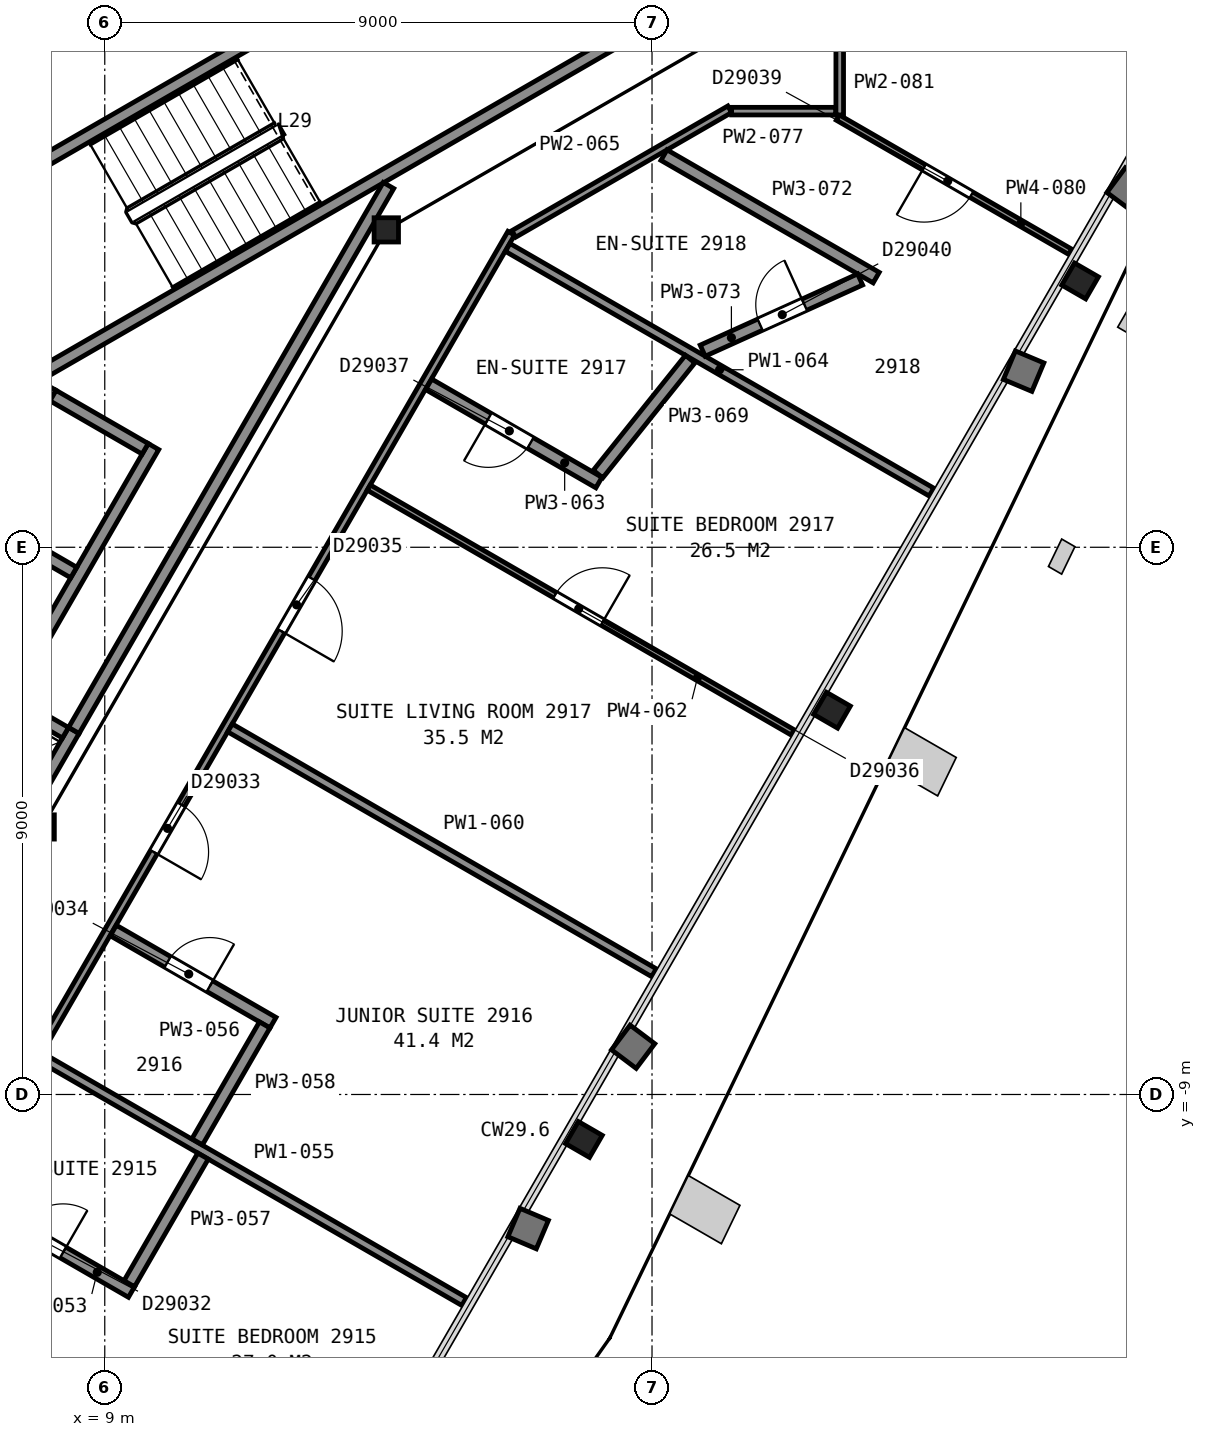
"""IFC4 building model, lengths in metres.
Left out: names, types, materials, properties, quantities, classifications, styles, units other than length and angle.
Written with IfcOpenShell. Run it as: python <this file> out.ifc"""

import sys

from ifc_helpers import new_model, si_unit, direction, frame, frame_2d, origin, origin_2d, place, context, subcontext, project, spatial, rectangle, i_section, extrude, element, fill, save


model = new_model("IFC4")
c1 = context("Model", 3, precision=1e-05, world=origin(), true_north=direction((0.0, 1.0)))
c2 = subcontext(c1, "Body", "Model", "MODEL_VIEW")
j1 = project(units=[si_unit("LENGTHUNIT", "METRE"), si_unit("PLANEANGLEUNIT", "RADIAN")], contexts=[c1])
p1 = place(None, origin())
s1 = spatial("IfcSite", under=j1, at=p1, CompositionType="ELEMENT")
p2 = place(p1, origin())
s2 = spatial("IfcBuilding", under=s1, at=p2, CompositionType="ELEMENT")
p3 = place(p2, frame((0.0, 0.0, 121.6)))
s3 = spatial("IfcBuildingStorey", under=s2, at=p3, CompositionType="ELEMENT", Elevation=121.6)
p4 = place(p3, frame((16.88, -9.74, 0.035), z_axis=(0.0, 0.0, 1.0), x_axis=(-0.5, -0.866025403784, 0.0)))
e1 = element("IfcColumn", 1, at=p4, inside=s3, PredefinedType="COLUMN", context=c2, shape_type="SweptSolid", body=[
    extrude(i_section(OverallWidth=0.419, OverallDepth=0.455, WebThickness=0.042, FlangeThickness=0.068, FilletRadius=0.015, at=origin_2d()), origin(), (0.0, 0.0, 1.0), 3.565),
])
p5 = place(p3, frame((20.96, -2.68, 0.04), z_axis=(0.0, 0.0, 1.0), x_axis=(-0.5, -0.866025403784, 0.0)))
e2 = element("IfcColumn", 2, at=p5, inside=s3, PredefinedType="COLUMN", context=c2, shape_type="SweptSolid", body=[
    extrude(i_section(OverallWidth=0.419, OverallDepth=0.455, WebThickness=0.042, FlangeThickness=0.068, FilletRadius=0.015, at=origin_2d()), origin(), (0.0, 0.0, 1.0), 3.56),
])
p6 = place(p3, frame((25.04, 4.38, 0.045), z_axis=(0.0, 0.0, 1.0), x_axis=(-0.5, -0.866025403784, 0.0)))
e3 = element("IfcColumn", 3, at=p6, inside=s3, PredefinedType="COLUMN", context=c2, shape_type="SweptSolid", body=[
    extrude(i_section(OverallWidth=0.419, OverallDepth=0.455, WebThickness=0.042, FlangeThickness=0.068, FilletRadius=0.015, at=origin_2d()), origin(), (0.0, 0.0, 1.0), 3.555),
])
for number, where, z_axis, x_axis in (
    (4, (13.63, 5.22, 0.0), (0.0, 0.0, 1.0), (1.0, 0.0, 0.0)),
    (5, (7.97, -4.6, 0.0), (0.0, 0.0, 1.0), (1.0, 0.0, 0.0)),
):
    element("IfcColumn", number, at=place(p3, frame(where, z_axis=z_axis, x_axis=x_axis)), inside=s3, PredefinedType="COLUMN", context=c2, shape_type="SweptSolid", body=[
        extrude(i_section(OverallWidth=0.401, OverallDepth=0.399, WebThickness=0.025, FlangeThickness=0.04, FilletRadius=0.015, at=origin_2d()), origin(), (0.0, 0.0, 1.0), 3.6),
    ])
for number, where, z_axis, x_axis in (
    (6, (6.178, 5.299, 0.0), (0.0, 0.0, 1.0), (0.866, 0.5, 0.0)),
    (7, (7.678, 2.701, 0.0), (0.0, 0.0, 1.0), (0.866, 0.5, 0.0)),
):
    element("IfcWall", number, at=place(p3, frame(where, z_axis=z_axis, x_axis=x_axis)), inside=s3, PredefinedType="PARTITIONING", context=c2, shape_type="SweptSolid", body=[
        extrude(rectangle(XDim=12.0, YDim=0.2, at=frame_2d((6.0, 0.0))), origin(), (0.0, 0.0, 1.0), 3.35),
    ])
p7 = place(p3, frame((7.216, -5.222, 0.0), z_axis=(0.0, 0.0, 1.0), x_axis=(0.499990435942, 0.866030925526, 0.0)))
e8 = element("IfcWall", 8, at=p7, inside=s3, PredefinedType="PARTITIONING", context=c2, shape_type="SweptSolid", body=[
    extrude(rectangle(XDim=2.55, YDim=0.2, at=frame_2d((1.275, 0.0))), origin(), (0.0, 0.0, 1.0), 3.6),
])
p8 = place(p3, frame((7.451, -2.414, 0.0), z_axis=(0.0, 0.0, 1.0), x_axis=(0.500016218704, 0.866016039709, 0.0)))
e9 = element("IfcWall", 9, at=p8, inside=s3, PredefinedType="PARTITIONING", context=c2, shape_type="SweptSolid", body=[
    extrude(rectangle(XDim=4.7, YDim=0.2, at=frame_2d((2.35, 0.0))), origin(), (0.0, 0.0, 1.0), 3.6),
])
p9 = place(p3, frame((5.663, -1.612, 0.0), z_axis=(0.0, 0.0, 1.0), x_axis=(0.49998122708, 0.866036242063, 0.0)))
e10 = element("IfcWall", 10, at=p9, inside=s3, PredefinedType="PARTITIONING", context=c2, shape_type="SweptSolid", body=[
    extrude(rectangle(XDim=4.9, YDim=0.2, at=frame_2d((2.45, 0.0))), origin(), (0.0, 0.0, 1.0), 3.6),
])
p10 = place(p3, frame((9.665, 1.62, 0.0), z_axis=(0.0, 0.0, 1.0), x_axis=(-0.866002029911, 0.500040482552, 0.0)))
e11 = element("IfcWall", 11, at=p10, inside=s3, PredefinedType="PARTITIONING", context=c2, shape_type="SweptSolid", body=[
    extrude(rectangle(XDim=1.75, YDim=0.2, at=frame_2d((0.875, 0.0))), origin(), (0.0, 0.0, 1.0), 3.6),
])
p11 = place(p3, frame((8.49, -0.416, 0.0), z_axis=(0.0, 0.0, 1.0), x_axis=(-0.866036909293, 0.499980071345, 0.0)))
e12 = element("IfcWall", 12, at=p11, inside=s3, PredefinedType="PARTITIONING", context=c2, shape_type="SweptSolid", body=[
    extrude(rectangle(XDim=1.75, YDim=0.2, at=frame_2d((0.875, 0.0))), origin(), (0.0, 0.0, 1.0), 3.6),
])
p12 = place(p3, frame((8.354, -3.051, 0.0), z_axis=(0.0, 0.0, 1.0), x_axis=(-0.866060182126, 0.499939757307, 0.0)))
e13 = element("IfcWall", 13, at=p12, inside=s3, PredefinedType="PARTITIONING", context=c2, shape_type="SweptSolid", body=[
    extrude(rectangle(XDim=2.95, YDim=0.2, at=frame_2d((1.475, 0.0))), origin(), (0.0, 0.0, 1.0), 3.6),
])
p13 = place(p3, frame((8.492, -3.012, 0.0), z_axis=(0.0, 0.0, 1.0), x_axis=(0.499972957231, 0.866041016371, 0.0)))
e14 = element("IfcWall", 14, at=p13, inside=s3, PredefinedType="PARTITIONING", context=c2, shape_type="SweptSolid", body=[
    extrude(rectangle(XDim=10.349, YDim=0.2, at=frame_2d((5.174, 0.0))), origin(), (0.0, 0.0, 1.0), 3.35),
])
p14 = place(p3, frame((15.684, 5.165, 0.0), z_axis=(0.0, 0.0, 1.0), x_axis=(-0.500027787016, -0.866009360349, 0.0)))
e15 = element("IfcWall", 15, at=p14, inside=s3, PredefinedType="PARTITIONING", context=c2, shape_type="SweptSolid", body=[
    extrude(rectangle(XDim=23.856, YDim=0.125, at=frame_2d((11.928, 0.0))), origin(), (0.0, 0.0, 1.0), 2.613),
])
p15 = place(p14, frame((21.493, 0.0, 0.0)))
e16 = element("IfcOpeningElement", 16, at=p15, cuts=e15, PredefinedType="OPENING", context=c2, shape_type="SweptSolid", body=[
    extrude(rectangle(XDim=1.0, YDim=2.1, at=frame_2d((0.5, 1.05))), frame((0.0, 0.073, 0.0), z_axis=(0.0, -1.0, 0.0), x_axis=(1.0, 0.0, 0.0)), (0.0, 0.0, 1.0), 0.145),
])
p16 = place(p14, frame((10.853, 0.0, 0.0)))
e17 = element("IfcOpeningElement", 17, at=p16, cuts=e15, PredefinedType="OPENING", context=c2, shape_type="SweptSolid", body=[
    extrude(rectangle(XDim=0.9, YDim=2.1, at=frame_2d((0.45, 1.05))), frame((0.0, 0.073, 0.0), z_axis=(0.0, -1.0, 0.0), x_axis=(1.0, 0.0, 0.0)), (0.0, 0.0, 1.0), 0.145),
])
p17 = place(p14, frame((6.558, 0.0, 0.0)))
e18 = element("IfcOpeningElement", 18, at=p17, cuts=e15, PredefinedType="OPENING", context=c2, shape_type="SweptSolid", body=[
    extrude(rectangle(XDim=1.0, YDim=2.1, at=frame_2d((0.5, 1.05))), frame((0.0, 0.073, 0.0), z_axis=(0.0, -1.0, 0.0), x_axis=(1.0, 0.0, 0.0)), (0.0, 0.0, 1.0), 0.145),
])
p18 = place(p3, frame((5.654, -12.331, 0.0), z_axis=(0.0, 0.0, 1.0), x_axis=(0.866051796338, -0.49995428397, 0.0)))
e19 = element("IfcWall", 19, at=p18, inside=s3, PredefinedType="PARTITIONING", context=c2, shape_type="SweptSolid", body=[
    extrude(rectangle(XDim=8.052, YDim=0.1, at=frame_2d((4.026, 0.0))), origin(), (0.0, 0.0, 1.0), 2.613),
])
p19 = place(p18, frame((3.538, 0.0, 0.0)))
e20 = element("IfcOpeningElement", 20, at=p19, cuts=e19, PredefinedType="OPENING", context=c2, shape_type="SweptSolid", body=[
    extrude(rectangle(XDim=0.9, YDim=2.1, at=frame_2d((0.45, 1.05))), frame((0.0, 0.06, 0.0), z_axis=(0.0, -1.0, 0.0), x_axis=(1.0, 0.0, 0.0)), (0.0, 0.0, 1.0), 0.12),
])
p20 = place(p3, frame((6.64, -10.633, 0.0), z_axis=(0.0, 0.0, 1.0), x_axis=(0.866022073929, -0.500005767435, 0.0)))
e21 = element("IfcWall", 21, at=p20, inside=s3, PredefinedType="PARTITIONING", context=c2, shape_type="SweptSolid", body=[
    extrude(rectangle(XDim=3.232, YDim=0.2, at=frame_2d((1.616, 0.0))), origin(), (0.0, 0.0, 1.0), 2.613),
])
p21 = place(p20, frame((1.133, 0.0, 0.0)))
e22 = element("IfcOpeningElement", 22, at=p21, cuts=e21, PredefinedType="OPENING", context=c2, shape_type="SweptSolid", body=[
    extrude(rectangle(XDim=0.8, YDim=2.1, at=frame_2d((0.4, 1.05))), frame((0.0, 0.11, 0.0), z_axis=(0.0, -1.0, 0.0), x_axis=(1.0, 0.0, 0.0)), (0.0, 0.0, 1.0), 0.22),
])
p22 = place(p3, frame((7.936, -8.379, 0.0), z_axis=(0.0, 0.0, 1.0), x_axis=(0.866044217767, -0.499967411811, 0.0)))
e23 = element("IfcWall", 23, at=p22, inside=s3, PredefinedType="PARTITIONING", context=c2, shape_type="SweptSolid", body=[
    extrude(rectangle(XDim=8.052, YDim=0.15, at=frame_2d((4.026, 0.0))), origin(), (0.0, 0.0, 1.0), 2.613),
])
p23 = place(p3, frame((11.767, -7.819, 0.0), z_axis=(0.0, 0.0, 1.0), x_axis=(-0.866009954834, 0.500026757412, 0.0)))
e24 = element("IfcWall", 24, at=p23, inside=s3, PredefinedType="PARTITIONING", context=c2, shape_type="SweptSolid", body=[
    extrude(rectangle(XDim=3.032, YDim=0.2, at=frame_2d((1.516, 0.0))), origin(), (0.0, 0.0, 1.0), 2.613),
])
p24 = place(p23, frame((1.2, 0.0, 0.0)))
e25 = element("IfcOpeningElement", 25, at=p24, cuts=e24, PredefinedType="OPENING", context=c2, shape_type="SweptSolid", body=[
    extrude(rectangle(XDim=0.8, YDim=2.1, at=frame_2d((0.4, 1.05))), frame((0.0, 0.11, 0.0), z_axis=(0.0, -1.0, 0.0), x_axis=(1.0, 0.0, 0.0)), (0.0, 0.0, 1.0), 0.22),
])
p25 = place(p3, frame((9.403, -12.112, 0.0), z_axis=(0.0, 0.0, 1.0), x_axis=(0.500103096288, 0.865965872932, 0.0)))
e26 = element("IfcWall", 26, at=p25, inside=s3, PredefinedType="PARTITIONING", context=c2, shape_type="SweptSolid", body=[
    extrude(rectangle(XDim=2.424, YDim=0.2, at=frame_2d((1.212, 0.0))), origin(), (0.0, 0.0, 1.0), 2.613),
])
p26 = place(p3, frame((10.52, -9.779, 0.0), z_axis=(0.0, 0.0, 1.0), x_axis=(0.499935013329, 0.866062920605, 0.0)))
e27 = element("IfcWall", 27, at=p26, inside=s3, PredefinedType="PARTITIONING", context=c2, shape_type="SweptSolid", body=[
    extrude(rectangle(XDim=2.22, YDim=0.2, at=frame_2d((1.11, 0.0))), origin(), (0.0, 0.0, 1.0), 2.613),
])
p27 = place(p3, frame((11.059, -2.97, 0.0), z_axis=(0.0, 0.0, 1.0), x_axis=(0.865968957472, -0.500097755139, 0.0)))
e28 = element("IfcWall", 28, at=p27, inside=s3, PredefinedType="PARTITIONING", context=c2, shape_type="SweptSolid", body=[
    extrude(rectangle(XDim=8.052, YDim=0.15, at=frame_2d((4.026, 0.0))), origin(), (0.0, 0.0, 1.0), 2.613),
])
p28 = place(p3, frame((13.341, 0.982, 0.0), z_axis=(0.0, 0.0, 1.0), x_axis=(0.865974505336, -0.500088148337, 0.0)))
e29 = element("IfcWall", 29, at=p28, inside=s3, PredefinedType="PARTITIONING", context=c2, shape_type="SweptSolid", body=[
    extrude(rectangle(XDim=8.052, YDim=0.1, at=frame_2d((4.026, 0.0))), origin(), (0.0, 0.0, 1.0), 2.613),
])
p29 = place(p28, frame((3.538, 0.0, 0.0)))
e30 = element("IfcOpeningElement", 30, at=p29, cuts=e29, PredefinedType="OPENING", context=c2, shape_type="SweptSolid", body=[
    extrude(rectangle(XDim=0.9, YDim=2.1, at=frame_2d((0.45, 1.05))), frame((0.0, 0.06, 0.0), z_axis=(0.0, -1.0, 0.0), x_axis=(1.0, 0.0, 0.0)), (0.0, 0.0, 1.0), 0.12),
])
p30 = place(p3, frame((14.326, 2.68, 0.0), z_axis=(0.0, 0.0, 1.0), x_axis=(0.86609757561, -0.499874973892, 0.0)))
e31 = element("IfcWall", 31, at=p30, inside=s3, PredefinedType="PARTITIONING", context=c2, shape_type="SweptSolid", body=[
    extrude(rectangle(XDim=3.233, YDim=0.2, at=frame_2d((1.617, 0.0))), origin(), (0.0, 0.0, 1.0), 2.613),
])
p31 = place(p30, frame((1.133, 0.0, 0.0)))
e32 = element("IfcOpeningElement", 32, at=p31, cuts=e31, PredefinedType="OPENING", context=c2, shape_type="SweptSolid", body=[
    extrude(rectangle(XDim=0.8, YDim=2.1, at=frame_2d((0.4, 1.05))), frame((0.0, 0.11, 0.0), z_axis=(0.0, -1.0, 0.0), x_axis=(1.0, 0.0, 0.0)), (0.0, 0.0, 1.0), 0.22),
])
p32 = place(p3, frame((15.626, 4.931, 0.0), z_axis=(0.0, 0.0, 1.0), x_axis=(0.866059795523, -0.49994042703, 0.0)))
e33 = element("IfcWall", 33, at=p32, inside=s3, PredefinedType="PARTITIONING", context=c2, shape_type="SweptSolid", body=[
    extrude(rectangle(XDim=8.047, YDim=0.15, at=frame_2d((4.024, 0.0))), origin(), (0.0, 0.0, 1.0), 2.613),
])
p33 = place(p3, frame((15.727, 5.154, 0.0), z_axis=(0.0, 0.0, 1.0), x_axis=(0.865992261418, 0.50005739987, 0.0)))
e34 = element("IfcWall", 34, at=p33, inside=s3, PredefinedType="PARTITIONING", context=c2, shape_type="SweptSolid", body=[
    extrude(rectangle(XDim=4.101, YDim=0.125, at=frame_2d((2.051, 0.0))), origin(), (0.0, 0.0, 1.0), 2.613),
])
p34 = place(p3, frame((17.112, 1.204, 0.0), z_axis=(0.0, 0.0, 1.0), x_axis=(0.625309237246, 0.780377061307, 0.0)))
e35 = element("IfcWall", 35, at=p34, inside=s3, PredefinedType="PARTITIONING", context=c2, shape_type="SweptSolid", body=[
    extrude(rectangle(XDim=2.423, YDim=0.2, at=frame_2d((1.211, 0.0))), origin(), (0.0, 0.0, 1.0), 2.613),
])
p35 = place(p3, frame((18.197, 6.45, 0.0), z_axis=(0.0, 0.0, 1.0), x_axis=(0.866031230052, -0.499989908473, 0.0)))
e36 = element("IfcWall", 36, at=p35, inside=s3, PredefinedType="PARTITIONING", context=c2, shape_type="SweptSolid", body=[
    extrude(rectangle(XDim=4.03, YDim=0.2, at=frame_2d((2.015, 0.0))), origin(), (0.0, 0.0, 1.0), 2.613),
])
p36 = place(p3, frame((18.833, 3.234, 0.0), z_axis=(0.0, 0.0, 1.0), x_axis=(0.911141723421, 0.412093144618, 0.0)))
e37 = element("IfcWall", 37, at=p36, inside=s3, PredefinedType="PARTITIONING", context=c2, shape_type="SweptSolid", body=[
    extrude(rectangle(XDim=2.841, YDim=0.2, at=frame_2d((1.421, 0.0))), origin(), (0.0, 0.0, 1.0), 2.613),
])
p37 = place(p36, frame((1.036, 0.0, 0.0)))
e38 = element("IfcOpeningElement", 38, at=p37, cuts=e37, PredefinedType="OPENING", context=c2, shape_type="SweptSolid", body=[
    extrude(rectangle(XDim=0.8, YDim=2.1, at=frame_2d((0.4, 1.05))), frame((0.0, 0.11, 0.0), z_axis=(0.0, -1.0, 0.0), x_axis=(1.0, 0.0, 0.0)), (0.0, 0.0, 1.0), 0.22),
])
p38 = place(p3, frame((19.309, 7.173, 0.0), z_axis=(0.0, 0.0, 1.0), x_axis=(1.0, 0.0, 0.0)))
e39 = element("IfcWall", 39, at=p38, inside=s3, PredefinedType="PARTITIONING", context=c2, shape_type="SweptSolid", body=[
    extrude(rectangle(XDim=1.713, YDim=0.125, at=frame_2d((0.856, 0.0))), origin(), (0.0, 0.0, 1.0), 2.613),
])
p39 = place(p3, frame((24.878, 4.86, 0.0), z_axis=(0.0, 0.0, 1.0), x_axis=(-0.866005058873, 0.500035236765, 0.0)))
e40 = element("IfcWall", 40, at=p39, inside=s3, PredefinedType="PARTITIONING", context=c2, shape_type="SweptSolid", body=[
    extrude(rectangle(XDim=4.414, YDim=0.1, at=frame_2d((2.207, 0.0))), origin(), (0.0, 0.0, 1.0), 2.613),
])
p40 = place(p39, frame((1.876, 0.0, 0.0)))
e41 = element("IfcOpeningElement", 41, at=p40, cuts=e40, PredefinedType="OPENING", context=c2, shape_type="SweptSolid", body=[
    extrude(rectangle(XDim=0.9, YDim=2.1, at=frame_2d((0.45, 1.05))), frame((0.0, 0.06, 0.0), z_axis=(0.0, -1.0, 0.0), x_axis=(1.0, 0.0, 0.0)), (0.0, 0.0, 1.0), 0.12),
])
p41 = place(p3, frame((21.087, 10.209, 0.0), z_axis=(0.0, 0.0, 1.0), x_axis=(0.0, -1.0, 0.0)))
e42 = element("IfcWall", 42, at=p41, inside=s3, PredefinedType="PARTITIONING", context=c2, shape_type="SweptSolid", body=[
    extrude(rectangle(XDim=3.099, YDim=0.125, at=frame_2d((1.549, 0.0))), origin(), (0.0, 0.0, 1.0), 2.613),
])
p42 = place(p41, frame((1.037, 0.0, 0.0)))
e43 = element("IfcOpeningElement", 43, at=p42, cuts=e42, PredefinedType="OPENING", context=c2, shape_type="SweptSolid", body=[
    extrude(rectangle(XDim=1.0, YDim=2.1, at=frame_2d((0.5, 1.05))), frame((0.0, 0.073, 0.0), z_axis=(0.0, -1.0, 0.0), x_axis=(1.0, 0.0, 0.0)), (0.0, 0.0, 1.0), 0.145),
])
p43 = place(p16, origin())
e44 = element("IfcDoor", 44, at=p43, inside=s3, OperationType="SINGLE_SWING_RIGHT", PredefinedType="DOOR", context=c2, shape_type="SweptSolid", body=[
    extrude(rectangle(XDim=0.9, YDim=2.1, at=frame_2d((0.45, 1.05))), frame((0.0, 0.025, 0.0), z_axis=(0.0, -1.0, 0.0), x_axis=(1.0, 0.0, 0.0)), (0.0, 0.0, 1.0), 0.05),
])
fill(e17, e44)
p44 = place(p17, origin())
e45 = element("IfcDoor", 45, at=p44, inside=s3, OperationType="SINGLE_SWING_RIGHT", PredefinedType="DOOR", context=c2, shape_type="SweptSolid", body=[
    extrude(rectangle(XDim=1.0, YDim=2.1, at=frame_2d((0.5, 1.05))), frame((0.0, 0.025, 0.0), z_axis=(0.0, -1.0, 0.0), x_axis=(1.0, 0.0, 0.0)), (0.0, 0.0, 1.0), 0.05),
])
fill(e18, e45)
p45 = place(p21, origin())
e46 = element("IfcDoor", 46, at=p45, inside=s3, OperationType="SINGLE_SWING_RIGHT", PredefinedType="DOOR", context=c2, shape_type="SweptSolid", body=[
    extrude(rectangle(XDim=0.8, YDim=2.1, at=frame_2d((0.4, 1.05))), frame((0.0, 0.025, 0.0), z_axis=(0.0, -1.0, 0.0), x_axis=(1.0, 0.0, 0.0)), (0.0, 0.0, 1.0), 0.05),
])
fill(e22, e46)
p46 = place(p24, origin())
e47 = element("IfcDoor", 47, at=p46, inside=s3, OperationType="SINGLE_SWING_LEFT", PredefinedType="DOOR", context=c2, shape_type="SweptSolid", body=[
    extrude(rectangle(XDim=0.8, YDim=2.1, at=frame_2d((0.4, 1.05))), frame((0.0, 0.025, 0.0), z_axis=(0.0, -1.0, 0.0), x_axis=(1.0, 0.0, 0.0)), (0.0, 0.0, 1.0), 0.05),
])
fill(e25, e47)
p47 = place(p29, origin())
e48 = element("IfcDoor", 48, at=p47, inside=s3, OperationType="SINGLE_SWING_RIGHT", PredefinedType="DOOR", context=c2, shape_type="SweptSolid", body=[
    extrude(rectangle(XDim=0.9, YDim=2.1, at=frame_2d((0.45, 1.05))), frame((0.0, 0.025, 0.0), z_axis=(0.0, -1.0, 0.0), x_axis=(1.0, 0.0, 0.0)), (0.0, 0.0, 1.0), 0.05),
])
fill(e30, e48)
p48 = place(p31, origin())
e49 = element("IfcDoor", 49, at=p48, inside=s3, OperationType="SINGLE_SWING_LEFT", PredefinedType="DOOR", context=c2, shape_type="SweptSolid", body=[
    extrude(rectangle(XDim=0.8, YDim=2.1, at=frame_2d((0.4, 1.05))), frame((0.0, 0.025, 0.0), z_axis=(0.0, -1.0, 0.0), x_axis=(1.0, 0.0, 0.0)), (0.0, 0.0, 1.0), 0.05),
])
fill(e32, e49)
p49 = place(p37, origin())
e50 = element("IfcDoor", 50, at=p49, inside=s3, OperationType="SINGLE_SWING_RIGHT", PredefinedType="DOOR", context=c2, shape_type="SweptSolid", body=[
    extrude(rectangle(XDim=0.8, YDim=2.1, at=frame_2d((0.4, 1.05))), frame((0.0, 0.025, 0.0), z_axis=(0.0, -1.0, 0.0), x_axis=(1.0, 0.0, 0.0)), (0.0, 0.0, 1.0), 0.05),
])
fill(e38, e50)
p50 = place(p40, origin())
e51 = element("IfcDoor", 51, at=p50, inside=s3, OperationType="SINGLE_SWING_RIGHT", PredefinedType="DOOR", context=c2, shape_type="SweptSolid", body=[
    extrude(rectangle(XDim=0.9, YDim=2.1, at=frame_2d((0.45, 1.05))), frame((0.0, 0.025, 0.0), z_axis=(0.0, -1.0, 0.0), x_axis=(1.0, 0.0, 0.0)), (0.0, 0.0, 1.0), 0.05),
])
fill(e41, e51)
save(model, sys.argv[1])
